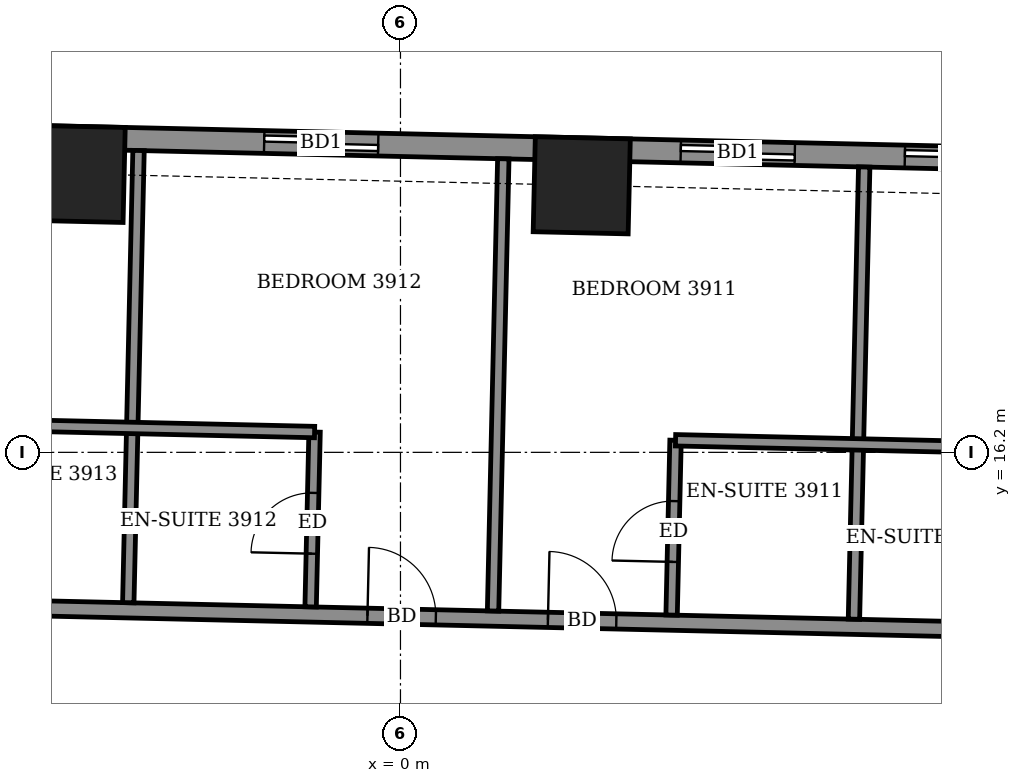
"""IFC4 building model, lengths in metres.
Left out: names, types, materials, properties, quantities, classifications, styles, units other than length and angle.
Written with IfcOpenShell. Run it as: python <this file> out.ifc"""

import sys

from ifc_helpers import new_model, si_unit, direction, frame, frame_2d, origin, origin_2d, place, context, subcontext, project, spatial, rectangle, extrude, element, fill, save


model = new_model("IFC4")
c1 = context("Model", 3, precision=1e-05, world=origin(), true_north=direction((0.0, 1.0)))
c2 = subcontext(c1, "Body", "Model", "MODEL_VIEW")
j1 = project(units=[si_unit("LENGTHUNIT", "METRE"), si_unit("PLANEANGLEUNIT", "RADIAN")], contexts=[c1])
p1 = place(None, origin())
s1 = spatial("IfcSite", under=j1, at=p1, CompositionType="ELEMENT")
p2 = place(p1, origin())
s2 = spatial("IfcBuilding", under=s1, at=p2, CompositionType="ELEMENT")
p3 = place(p2, frame((0.0, 0.0, 156.3)))
s3 = spatial("IfcBuildingStorey", under=s2, at=p3, CompositionType="ELEMENT", Elevation=156.3)
for number, where, z_axis, x_axis in (
    (1, (2.385, 19.713, -0.55), (0.0, 0.0, 1.0), (-1.0, 0.023, 0.0)),
    (2, (-4.26, 19.863, -0.55), (0.0, 0.0, 1.0), (-1.0, 0.023, 0.0)),
):
    element("IfcColumn", number, at=place(p3, frame(where, z_axis=z_axis, x_axis=x_axis)), inside=s3, PredefinedType="COLUMN", context=c2, shape_type="SweptSolid", body=[
        extrude(rectangle(XDim=1.25, YDim=1.25, at=origin_2d()), origin(), (0.0, 0.0, 1.0), 3.6),
    ])
p4 = place(p3, frame((22.181, 19.739, 0.0), z_axis=(0.0, 0.0, 1.0), x_axis=(-0.999742618326, 0.022686936846, 0.0)))
e3 = element("IfcWall", 3, at=p4, inside=s3, PredefinedType="SOLIDWALL", context=c2, shape_type="SweptSolid", body=[
    extrude(rectangle(XDim=39.58, YDim=0.3, at=frame_2d((19.79, 0.0))), origin(), (0.0, 0.0, 1.0), 3.05),
])
p5 = place(p4, frame((2.716, 0.0, 0.0)))
e4 = element("IfcOpeningElement", 4, at=p5, cuts=e3, PredefinedType="OPENING", context=c2, shape_type="SweptSolid", body=[
    extrude(rectangle(XDim=1.5, YDim=2.4, at=frame_2d((0.75, 1.2))), frame((0.0, 0.16, 0.0), z_axis=(0.0, -1.0, 0.0), x_axis=(1.0, 0.0, 0.0)), (0.0, 0.0, 1.0), 0.32),
])
p6 = place(p4, frame((8.326, 0.0, 0.0)))
e5 = element("IfcOpeningElement", 5, at=p6, cuts=e3, PredefinedType="OPENING", context=c2, shape_type="SweptSolid", body=[
    extrude(rectangle(XDim=1.5, YDim=2.4, at=frame_2d((0.75, 1.2))), frame((0.0, 0.16, 0.0), z_axis=(0.0, -1.0, 0.0), x_axis=(1.0, 0.0, 0.0)), (0.0, 0.0, 1.0), 0.32),
])
p7 = place(p4, frame((14.049, 0.0, 0.0)))
e6 = element("IfcOpeningElement", 6, at=p7, cuts=e3, PredefinedType="OPENING", context=c2, shape_type="SweptSolid", body=[
    extrude(rectangle(XDim=1.5, YDim=2.4, at=frame_2d((0.75, 1.2))), frame((0.0, 0.16, 0.0), z_axis=(0.0, -1.0, 0.0), x_axis=(1.0, 0.0, 0.0)), (0.0, 0.0, 1.0), 0.32),
])
p8 = place(p4, frame((16.998, 0.0, 0.0)))
e7 = element("IfcOpeningElement", 7, at=p8, cuts=e3, PredefinedType="OPENING", context=c2, shape_type="SweptSolid", body=[
    extrude(rectangle(XDim=1.5, YDim=2.4, at=frame_2d((0.75, 1.2))), frame((0.0, 0.16, 0.0), z_axis=(0.0, -1.0, 0.0), x_axis=(1.0, 0.0, 0.0)), (0.0, 0.0, 1.0), 0.32),
])
p9 = place(p4, frame((22.48, 0.0, 0.0)))
e8 = element("IfcOpeningElement", 8, at=p9, cuts=e3, PredefinedType="OPENING", context=c2, shape_type="SweptSolid", body=[
    extrude(rectangle(XDim=1.5, YDim=2.4, at=frame_2d((0.75, 1.2))), frame((0.0, 0.16, 0.0), z_axis=(0.0, -1.0, 0.0), x_axis=(1.0, 0.0, 0.0)), (0.0, 0.0, 1.0), 0.32),
])
p10 = place(p4, frame((27.846, 0.0, 0.0)))
e9 = element("IfcOpeningElement", 9, at=p10, cuts=e3, PredefinedType="OPENING", context=c2, shape_type="SweptSolid", body=[
    extrude(rectangle(XDim=1.5, YDim=2.4, at=frame_2d((0.75, 1.2))), frame((0.0, 0.16, 0.0), z_axis=(0.0, -1.0, 0.0), x_axis=(1.0, 0.0, 0.0)), (0.0, 0.0, 1.0), 0.32),
])
p11 = place(p4, frame((30.794, 0.0, 0.0)))
e10 = element("IfcOpeningElement", 10, at=p11, cuts=e3, PredefinedType="OPENING", context=c2, shape_type="SweptSolid", body=[
    extrude(rectangle(XDim=1.5, YDim=2.4, at=frame_2d((0.75, 1.2))), frame((0.0, 0.16, 0.0), z_axis=(0.0, -1.0, 0.0), x_axis=(1.0, 0.0, 0.0)), (0.0, 0.0, 1.0), 0.32),
])
p12 = place(p4, frame((35.705, 0.0, 0.9)))
e11 = element("IfcOpeningElement", 11, at=p12, cuts=e3, PredefinedType="OPENING", context=c2, shape_type="SweptSolid", body=[
    extrude(rectangle(XDim=2.4, YDim=1.5, at=frame_2d((1.2, 0.75))), frame((0.0, 0.16, 0.0), z_axis=(0.0, -1.0, 0.0), x_axis=(1.0, 0.0, 0.0)), (0.0, 0.0, 1.0), 0.32),
])
p13 = place(p3, frame((-21.279, 14.523, 0.0), z_axis=(0.0, 0.0, 1.0), x_axis=(0.999742669174, -0.02268469602, 0.0)))
e12 = element("IfcWall", 12, at=p13, inside=s3, PredefinedType="PARTITIONING", context=c2, shape_type="SweptSolid", body=[
    extrude(rectangle(XDim=40.639, YDim=0.2, at=frame_2d((20.319, 0.0))), origin(), (0.0, 0.0, 1.0), 3.05),
])
p14 = place(p13, frame((37.65, 0.0, 0.0)))
e13 = element("IfcOpeningElement", 13, at=p14, cuts=e12, PredefinedType="OPENING", context=c2, shape_type="SweptSolid", body=[
    extrude(rectangle(XDim=0.9, YDim=2.1, at=frame_2d((0.45, 1.05))), frame((0.0, 0.11, 0.0), z_axis=(0.0, -1.0, 0.0), x_axis=(1.0, 0.0, 0.0)), (0.0, 0.0, 1.0), 0.22),
])
p15 = place(p13, frame((32.775, 0.0, 0.0)))
e14 = element("IfcOpeningElement", 14, at=p15, cuts=e12, PredefinedType="OPENING", context=c2, shape_type="SweptSolid", body=[
    extrude(rectangle(XDim=0.9, YDim=2.1, at=frame_2d((0.45, 1.05))), frame((0.0, 0.11, 0.0), z_axis=(0.0, -1.0, 0.0), x_axis=(1.0, 0.0, 0.0)), (0.0, 0.0, 1.0), 0.22),
])
p16 = place(p13, frame((30.4, 0.0, 0.0)))
e15 = element("IfcOpeningElement", 15, at=p16, cuts=e12, PredefinedType="OPENING", context=c2, shape_type="SweptSolid", body=[
    extrude(rectangle(XDim=0.9, YDim=2.1, at=frame_2d((0.45, 1.05))), frame((0.0, 0.11, 0.0), z_axis=(0.0, -1.0, 0.0), x_axis=(1.0, 0.0, 0.0)), (0.0, 0.0, 1.0), 0.22),
])
p17 = place(p13, frame((23.225, 0.0, 0.0)))
e16 = element("IfcOpeningElement", 16, at=p17, cuts=e12, PredefinedType="OPENING", context=c2, shape_type="SweptSolid", body=[
    extrude(rectangle(XDim=0.9, YDim=2.1, at=frame_2d((0.45, 1.05))), frame((0.0, 0.11, 0.0), z_axis=(0.0, -1.0, 0.0), x_axis=(1.0, 0.0, 0.0)), (0.0, 0.0, 1.0), 0.22),
])
p18 = place(p13, frame((20.85, 0.0, 0.0)))
e17 = element("IfcOpeningElement", 17, at=p18, cuts=e12, PredefinedType="OPENING", context=c2, shape_type="SweptSolid", body=[
    extrude(rectangle(XDim=0.9, YDim=2.1, at=frame_2d((0.45, 1.05))), frame((0.0, 0.11, 0.0), z_axis=(0.0, -1.0, 0.0), x_axis=(1.0, 0.0, 0.0)), (0.0, 0.0, 1.0), 0.22),
])
p19 = place(p13, frame((13.675, 0.0, 0.0)))
e18 = element("IfcOpeningElement", 18, at=p19, cuts=e12, PredefinedType="OPENING", context=c2, shape_type="SweptSolid", body=[
    extrude(rectangle(XDim=0.9, YDim=2.1, at=frame_2d((0.45, 1.05))), frame((0.0, 0.11, 0.0), z_axis=(0.0, -1.0, 0.0), x_axis=(1.0, 0.0, 0.0)), (0.0, 0.0, 1.0), 0.22),
])
p20 = place(p13, frame((11.325, 0.0, 0.0)))
e19 = element("IfcOpeningElement", 19, at=p20, cuts=e12, PredefinedType="OPENING", context=c2, shape_type="SweptSolid", body=[
    extrude(rectangle(XDim=0.9, YDim=2.1, at=frame_2d((0.45, 1.05))), frame((0.0, 0.11, 0.0), z_axis=(0.0, -1.0, 0.0), x_axis=(1.0, 0.0, 0.0)), (0.0, 0.0, 1.0), 0.22),
])
p21 = place(p13, frame((1.6, 0.0, 0.0)))
e20 = element("IfcOpeningElement", 20, at=p21, cuts=e12, PredefinedType="OPENING", context=c2, shape_type="SweptSolid", body=[
    extrude(rectangle(XDim=1.0, YDim=2.1, at=frame_2d((0.5, 1.05))), frame((0.0, 0.11, 0.0), z_axis=(0.0, -1.0, 0.0), x_axis=(1.0, 0.0, 0.0)), (0.0, 0.0, 1.0), 0.22),
])
p22 = place(p13, frame((6.55, 0.0, 0.0)))
e21 = element("IfcOpeningElement", 21, at=p22, cuts=e12, PredefinedType="OPENING", context=c2, shape_type="SweptSolid", body=[
    extrude(rectangle(XDim=0.9, YDim=2.1, at=frame_2d((0.45, 1.05))), frame((0.0, 0.11, 0.0), z_axis=(0.0, -1.0, 0.0), x_axis=(1.0, 0.0, 0.0)), (0.0, 0.0, 1.0), 0.22),
])
p23 = place(p3, frame((-3.581, 14.222, 0.0), z_axis=(0.0, 0.0, 1.0), x_axis=(0.022688785847, 0.999742576365, 0.0)))
e22 = element("IfcWall", 22, at=p23, inside=s3, PredefinedType="PARTITIONING", context=c2, shape_type="SweptSolid", body=[
    extrude(rectangle(XDim=5.95, YDim=0.15, at=frame_2d((2.975, 0.0))), origin(), (0.0, 0.0, 1.0), 2.55),
])
p24 = place(p3, frame((-1.182, 14.167, 0.0), z_axis=(0.0, 0.0, 1.0), x_axis=(0.022603288534, 0.999744513037, 0.0)))
e23 = element("IfcWall", 23, at=p24, inside=s3, PredefinedType="PARTITIONING", context=c2, shape_type="SweptSolid", body=[
    extrude(rectangle(XDim=2.301, YDim=0.15, at=frame_2d((1.15, 0.0))), origin(), (0.0, 0.0, 1.0), 3.05),
])
p25 = place(p24, frame((0.7, 0.0, 0.0)))
e24 = element("IfcOpeningElement", 24, at=p25, cuts=e23, PredefinedType="OPENING", context=c2, shape_type="SweptSolid", body=[
    extrude(rectangle(XDim=0.8, YDim=2.1, at=frame_2d((0.4, 1.05))), frame((0.0, 0.085, 0.0), z_axis=(0.0, -1.0, 0.0), x_axis=(1.0, 0.0, 0.0)), (0.0, 0.0, 1.0), 0.17),
])
p26 = place(p3, frame((1.218, 14.113, 0.0), z_axis=(0.0, 0.0, 1.0), x_axis=(0.022688785847, 0.999742576365, 0.0)))
e25 = element("IfcWall", 25, at=p26, inside=s3, PredefinedType="PARTITIONING", context=c2, shape_type="SweptSolid", body=[
    extrude(rectangle(XDim=5.95, YDim=0.15, at=frame_2d((2.975, 0.0))), origin(), (0.0, 0.0, 1.0), 2.55),
])
p27 = place(p3, frame((3.567, 14.059, 0.0), z_axis=(0.0, 0.0, 1.0), x_axis=(0.022605686808, 0.999744458811, 0.0)))
e26 = element("IfcWall", 26, at=p27, inside=s3, PredefinedType="PARTITIONING", context=c2, shape_type="SweptSolid", body=[
    extrude(rectangle(XDim=2.3, YDim=0.15, at=frame_2d((1.15, 0.0))), origin(), (0.0, 0.0, 1.0), 3.05),
])
p28 = place(p27, frame((0.7, 0.0, 0.0)))
e27 = element("IfcOpeningElement", 27, at=p28, cuts=e26, PredefinedType="OPENING", context=c2, shape_type="SweptSolid", body=[
    extrude(rectangle(XDim=0.8, YDim=2.1, at=frame_2d((0.4, 1.05))), frame((0.0, 0.085, 0.0), z_axis=(0.0, -1.0, 0.0), x_axis=(1.0, 0.0, 0.0)), (0.0, 0.0, 1.0), 0.17),
])
p29 = place(p3, frame((5.966, 14.005, 0.0), z_axis=(0.0, 0.0, 1.0), x_axis=(0.022687855237, 0.999742597484, 0.0)))
e28 = element("IfcWall", 28, at=p29, inside=s3, PredefinedType="PARTITIONING", context=c2, shape_type="SweptSolid", body=[
    extrude(rectangle(XDim=5.951, YDim=0.15, at=frame_2d((2.975, 0.0))), origin(), (0.0, 0.0, 1.0), 2.55),
])
p30 = place(p3, frame((-5.928, 16.575, 0.0), z_axis=(0.0, 0.0, 1.0), x_axis=(0.999747191239, -0.022484519337, 0.0)))
e29 = element("IfcWall", 29, at=p30, inside=s3, PredefinedType="PARTITIONING", context=c2, shape_type="SweptSolid", body=[
    extrude(rectangle(XDim=4.799, YDim=0.15, at=frame_2d((2.4, 0.0))), origin(), (0.0, 0.0, 1.0), 3.05),
])
p31 = place(p3, frame((3.619, 16.359, 0.0), z_axis=(0.0, 0.0, 1.0), x_axis=(0.999742701292, -0.022683280499, 0.0)))
e30 = element("IfcWall", 30, at=p31, inside=s3, PredefinedType="PARTITIONING", context=c2, shape_type="SweptSolid", body=[
    extrude(rectangle(XDim=4.8, YDim=0.15, at=frame_2d((2.4, 0.0))), origin(), (0.0, 0.0, 1.0), 3.05),
])
p32 = place(p7, origin())
e31 = element("IfcDoor", 31, at=p32, inside=s3, OperationType="SLIDING_TO_LEFT", PredefinedType="DOOR", context=c2, shape_type="SweptSolid", body=[
    extrude(rectangle(XDim=1.5, YDim=2.4, at=frame_2d((0.75, 1.2))), frame((0.0, 0.025, 0.0), z_axis=(0.0, -1.0, 0.0), x_axis=(1.0, 0.0, 0.0)), (0.0, 0.0, 1.0), 0.05),
])
fill(e6, e31)
p33 = place(p8, origin())
e32 = element("IfcDoor", 32, at=p33, inside=s3, OperationType="SLIDING_TO_LEFT", PredefinedType="DOOR", context=c2, shape_type="SweptSolid", body=[
    extrude(rectangle(XDim=1.5, YDim=2.4, at=frame_2d((0.75, 1.2))), frame((0.0, 0.025, 0.0), z_axis=(0.0, -1.0, 0.0), x_axis=(1.0, 0.0, 0.0)), (0.0, 0.0, 1.0), 0.05),
])
fill(e7, e32)
p34 = place(p9, origin())
e33 = element("IfcDoor", 33, at=p34, inside=s3, OperationType="SLIDING_TO_LEFT", PredefinedType="DOOR", context=c2, shape_type="SweptSolid", body=[
    extrude(rectangle(XDim=1.5, YDim=2.4, at=frame_2d((0.75, 1.2))), frame((0.0, 0.025, 0.0), z_axis=(0.0, -1.0, 0.0), x_axis=(1.0, 0.0, 0.0)), (0.0, 0.0, 1.0), 0.05),
])
fill(e8, e33)
p35 = place(p17, origin())
e34 = element("IfcDoor", 34, at=p35, inside=s3, OperationType="SINGLE_SWING_LEFT", PredefinedType="DOOR", context=c2, shape_type="SweptSolid", body=[
    extrude(rectangle(XDim=0.9, YDim=2.1, at=frame_2d((0.45, 1.05))), frame((0.0, 0.025, 0.0), z_axis=(0.0, -1.0, 0.0), x_axis=(1.0, 0.0, 0.0)), (0.0, 0.0, 1.0), 0.05),
])
fill(e16, e34)
p36 = place(p28, origin())
e35 = element("IfcDoor", 35, at=p36, inside=s3, OperationType="SINGLE_SWING_LEFT", PredefinedType="DOOR", context=c2, shape_type="SweptSolid", body=[
    extrude(rectangle(XDim=0.8, YDim=2.1, at=frame_2d((0.4, 1.05))), frame((0.0, 0.025, 0.0), z_axis=(0.0, -1.0, 0.0), x_axis=(1.0, 0.0, 0.0)), (0.0, 0.0, 1.0), 0.05),
])
fill(e27, e35)
p37 = place(p18, origin())
e36 = element("IfcDoor", 36, at=p37, inside=s3, OperationType="SINGLE_SWING_RIGHT", PredefinedType="DOOR", context=c2, shape_type="SweptSolid", body=[
    extrude(rectangle(XDim=0.9, YDim=2.1, at=frame_2d((0.45, 1.05))), frame((0.0, 0.025, 0.0), z_axis=(0.0, -1.0, 0.0), x_axis=(1.0, 0.0, 0.0)), (0.0, 0.0, 1.0), 0.05),
])
fill(e17, e36)
p38 = place(p25, origin())
e37 = element("IfcDoor", 37, at=p38, inside=s3, OperationType="SINGLE_SWING_RIGHT", PredefinedType="DOOR", context=c2, shape_type="SweptSolid", body=[
    extrude(rectangle(XDim=0.8, YDim=2.1, at=frame_2d((0.4, 1.05))), frame((0.0, 0.025, 0.0), z_axis=(0.0, -1.0, 0.0), x_axis=(1.0, 0.0, 0.0)), (0.0, 0.0, 1.0), 0.05),
])
fill(e24, e37)
save(model, sys.argv[1])
